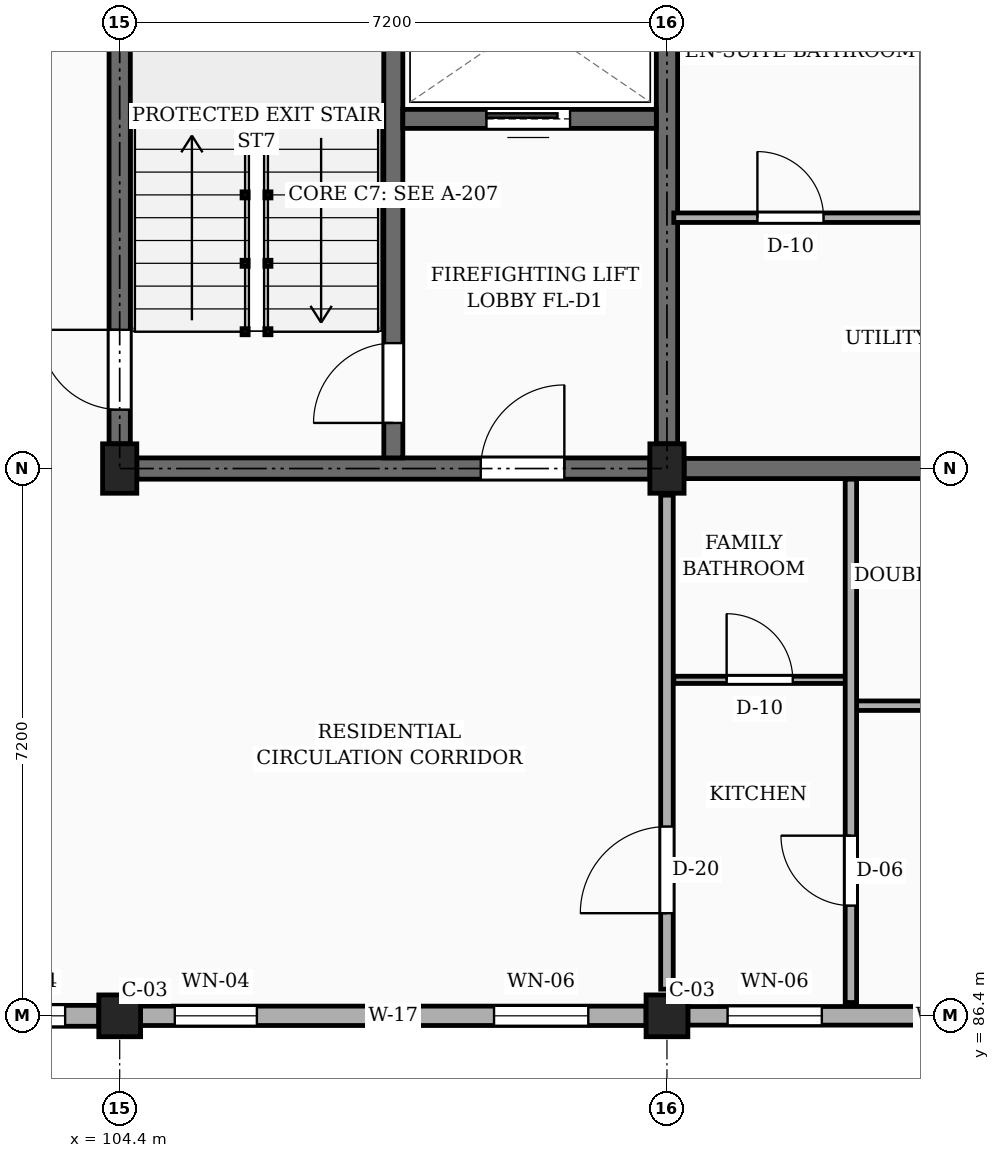
"""IFC4 building model, lengths in metres.
Left out: names, types, materials, properties, quantities, classifications, styles, units other than length and angle.
Written with IfcOpenShell. Run it as: python <this file> out.ifc"""

import sys

from ifc_helpers import new_model, si_unit, direction, frame, frame_2d, origin, origin_2d, place, context, subcontext, project, spatial, rectangle, extrude, element, fill, save


model = new_model("IFC4")
c1 = context("Model", 3, precision=1e-05, world=origin(), true_north=direction((0.0, 1.0)))
c2 = subcontext(c1, "Body", "Model", "MODEL_VIEW")
j1 = project(units=[si_unit("LENGTHUNIT", "METRE"), si_unit("PLANEANGLEUNIT", "RADIAN")], contexts=[c1])
p1 = place(None, origin())
s1 = spatial("IfcSite", under=j1, at=p1, CompositionType="ELEMENT")
p2 = place(p1, origin())
s2 = spatial("IfcBuilding", under=s1, at=p2, CompositionType="ELEMENT")
p3 = place(p2, frame((0.0, 0.0, 10.8)))
s3 = spatial("IfcBuildingStorey", under=s2, at=p3, CompositionType="ELEMENT", Elevation=10.8)
p4 = place(p3, frame((104.4, 86.4, 0.0), z_axis=(0.0, 0.0, 1.0), x_axis=(1.0, 0.0, 0.0)))
e1 = element("IfcColumn", 1, at=p4, inside=s3, PredefinedType="COLUMN", context=c2, shape_type="SweptSolid", body=[
    extrude(rectangle(XDim=0.55, YDim=0.55, at=origin_2d()), origin(), (0.0, 0.0, 1.0), 3.15),
])
p5 = place(p3, frame((104.4, 93.6, 0.0), z_axis=(0.0, 0.0, 1.0), x_axis=(1.0, 0.0, 0.0)))
e2 = element("IfcColumn", 2, at=p5, inside=s3, PredefinedType="COLUMN", context=c2, shape_type="SweptSolid", body=[
    extrude(rectangle(XDim=0.45, YDim=0.65, at=origin_2d()), origin(), (0.0, 0.0, 1.0), 3.15),
])
p6 = place(p3, frame((111.6, 86.4, 0.0), z_axis=(0.0, 0.0, 1.0), x_axis=(1.0, 0.0, 0.0)))
e3 = element("IfcColumn", 3, at=p6, inside=s3, PredefinedType="COLUMN", context=c2, shape_type="SweptSolid", body=[
    extrude(rectangle(XDim=0.55, YDim=0.55, at=origin_2d()), origin(), (0.0, 0.0, 1.0), 3.15),
])
p7 = place(p3, frame((111.6, 93.6, 0.0), z_axis=(0.0, 0.0, 1.0), x_axis=(1.0, 0.0, 0.0)))
e4 = element("IfcColumn", 4, at=p7, inside=s3, PredefinedType="COLUMN", context=c2, shape_type="SweptSolid", body=[
    extrude(rectangle(XDim=0.45, YDim=0.65, at=origin_2d()), origin(), (0.0, 0.0, 1.0), 3.15),
])
p8 = place(p3, frame((111.825, 93.6, 0.0), z_axis=(0.0, 0.0, 1.0), x_axis=(1.0, 0.0, 0.0)))
e5 = element("IfcWall", 5, at=p8, inside=s3, PredefinedType="SOLIDWALL", context=c2, shape_type="SweptSolid", body=[
    extrude(rectangle(XDim=6.7, YDim=0.265, at=frame_2d((3.35, 0.0))), origin(), (0.0, 0.0, 1.0), 2.19),
])
p9 = place(p8, frame((4.35, 0.0, 0.0)))
e6 = element("IfcOpeningElement", 6, at=p9, cuts=e5, PredefinedType="OPENING", context=c2, shape_type="SweptSolid", body=[
    extrude(rectangle(XDim=0.98, YDim=2.12, at=frame_2d((0.49, 1.06))), frame((0.0, 0.143, 0.0), z_axis=(0.0, -1.0, 0.0), x_axis=(1.0, 0.0, 0.0)), (0.0, 0.0, 1.0), 0.285),
])
p10 = place(p3, frame((97.475, 86.4, 0.0), z_axis=(0.0, 0.0, 1.0), x_axis=(1.0, 0.0, 0.0)))
e7 = element("IfcWall", 7, at=p10, inside=s3, PredefinedType="SOLIDWALL", context=c2, shape_type="SweptSolid", body=[
    extrude(rectangle(XDim=6.65, YDim=0.275, at=frame_2d((3.325, 0.0))), origin(), (0.0, 0.0, 1.0), 2.46),
])
p11 = place(p10, frame((2.665, 0.0, 0.78)))
e8 = element("IfcOpeningElement", 8, at=p11, cuts=e7, PredefinedType="OPENING", context=c2, shape_type="SweptSolid", body=[
    extrude(rectangle(XDim=0.92, YDim=1.15, at=frame_2d((0.46, 0.575))), frame((0.0, 0.147, 0.0), z_axis=(0.0, -1.0, 0.0), x_axis=(1.0, 0.0, 0.0)), (0.0, 0.0, 1.0), 0.295),
])
p12 = place(p10, frame((5.127, 0.0, 0.78)))
e9 = element("IfcOpeningElement", 9, at=p12, cuts=e7, PredefinedType="OPENING", context=c2, shape_type="SweptSolid", body=[
    extrude(rectangle(XDim=1.08, YDim=1.15, at=frame_2d((0.54, 0.575))), frame((0.0, 0.147, 0.0), z_axis=(0.0, -1.0, 0.0), x_axis=(1.0, 0.0, 0.0)), (0.0, 0.0, 1.0), 0.295),
])
p13 = place(p3, frame((104.675, 86.4, 0.0), z_axis=(0.0, 0.0, 1.0), x_axis=(1.0, 0.0, 0.0)))
e10 = element("IfcWall", 10, at=p13, inside=s3, PredefinedType="SOLIDWALL", context=c2, shape_type="SweptSolid", body=[
    extrude(rectangle(XDim=6.65, YDim=0.255, at=frame_2d((3.325, 0.0))), origin(), (0.0, 0.0, 1.0), 2.46),
])
p14 = place(p13, frame((0.45, 0.0, 0.78)))
e11 = element("IfcOpeningElement", 11, at=p14, cuts=e10, PredefinedType="OPENING", context=c2, shape_type="SweptSolid", body=[
    extrude(rectangle(XDim=1.08, YDim=1.15, at=frame_2d((0.54, 0.575))), frame((0.0, 0.137, 0.0), z_axis=(0.0, -1.0, 0.0), x_axis=(1.0, 0.0, 0.0)), (0.0, 0.0, 1.0), 0.275),
])
p15 = place(p13, frame((4.65, 0.0, 0.78)))
e12 = element("IfcOpeningElement", 12, at=p15, cuts=e10, PredefinedType="OPENING", context=c2, shape_type="SweptSolid", body=[
    extrude(rectangle(XDim=1.24, YDim=1.15, at=frame_2d((0.62, 0.575))), frame((0.0, 0.137, 0.0), z_axis=(0.0, -1.0, 0.0), x_axis=(1.0, 0.0, 0.0)), (0.0, 0.0, 1.0), 0.275),
])
p16 = place(p3, frame((111.875, 86.4, 0.0), z_axis=(0.0, 0.0, 1.0), x_axis=(1.0, 0.0, 0.0)))
e13 = element("IfcWall", 13, at=p16, inside=s3, PredefinedType="SOLIDWALL", context=c2, shape_type="SweptSolid", body=[
    extrude(rectangle(XDim=6.65, YDim=0.245, at=frame_2d((3.325, 0.0))), origin(), (0.0, 0.0, 1.0), 2.46),
])
p17 = place(p16, frame((0.522, 0.0, 0.78)))
e14 = element("IfcOpeningElement", 14, at=p17, cuts=e13, PredefinedType="OPENING", context=c2, shape_type="SweptSolid", body=[
    extrude(rectangle(XDim=1.24, YDim=1.15, at=frame_2d((0.62, 0.575))), frame((0.0, 0.133, 0.0), z_axis=(0.0, -1.0, 0.0), x_axis=(1.0, 0.0, 0.0)), (0.0, 0.0, 1.0), 0.265),
])
p18 = place(p16, frame((3.627, 0.0, 0.78)))
e15 = element("IfcOpeningElement", 15, at=p18, cuts=e13, PredefinedType="OPENING", context=c2, shape_type="SweptSolid", body=[
    extrude(rectangle(XDim=1.4, YDim=1.15, at=frame_2d((0.7, 0.575))), frame((0.0, 0.133, 0.0), z_axis=(0.0, -1.0, 0.0), x_axis=(1.0, 0.0, 0.0)), (0.0, 0.0, 1.0), 0.265),
])
p19 = place(p3, frame((104.4, 93.925, 0.0), z_axis=(0.0, 0.0, 1.0), x_axis=(0.0, 1.0, 0.0)))
e16 = element("IfcWall", 16, at=p19, inside=s3, PredefinedType="SHEAR", context=c2, shape_type="SweptSolid", body=[
    extrude(rectangle(XDim=6.55, YDim=0.28, at=frame_2d((3.275, 0.0))), origin(), (0.0, 0.0, 1.0), 2.89),
])
p20 = place(p19, frame((0.45, 0.0, 0.0)))
e17 = element("IfcOpeningElement", 17, at=p20, cuts=e16, PredefinedType="OPENING", context=c2, shape_type="SweptSolid", body=[
    extrude(rectangle(XDim=1.05, YDim=2.15, at=frame_2d((0.525, 1.075))), frame((0.0, 0.15, 0.0), z_axis=(0.0, -1.0, 0.0), x_axis=(1.0, 0.0, 0.0)), (0.0, 0.0, 1.0), 0.3),
])
p21 = place(p3, frame((111.6, 93.925, 0.0), z_axis=(0.0, 0.0, 1.0), x_axis=(0.0, 1.0, 0.0)))
e18 = element("IfcWall", 18, at=p21, inside=s3, PredefinedType="SHEAR", context=c2, shape_type="SweptSolid", body=[
    extrude(rectangle(XDim=6.55, YDim=0.28, at=frame_2d((3.275, 0.0))), origin(), (0.0, 0.0, 1.0), 2.89),
])
p22 = place(p3, frame((104.625, 93.6, 0.0), z_axis=(0.0, 0.0, 1.0), x_axis=(1.0, 0.0, 0.0)))
e19 = element("IfcWall", 19, at=p22, inside=s3, PredefinedType="SHEAR", context=c2, shape_type="SweptSolid", body=[
    extrude(rectangle(XDim=6.75, YDim=0.28, at=frame_2d((3.375, 0.0))), origin(), (0.0, 0.0, 1.0), 2.89),
])
p23 = place(p22, frame((4.525, 0.0, 0.0)))
e20 = element("IfcOpeningElement", 20, at=p23, cuts=e19, PredefinedType="OPENING", context=c2, shape_type="SweptSolid", body=[
    extrude(rectangle(XDim=1.1, YDim=2.15, at=frame_2d((0.55, 1.075))), frame((0.0, 0.15, 0.0), z_axis=(0.0, -1.0, 0.0), x_axis=(1.0, 0.0, 0.0)), (0.0, 0.0, 1.0), 0.3),
])
p24 = place(p3, frame((108.0, 93.74, 0.0), z_axis=(0.0, 0.0, 1.0), x_axis=(0.0, 1.0, 0.0)))
e21 = element("IfcWall", 21, at=p24, inside=s3, PredefinedType="SHEAR", context=c2, shape_type="SweptSolid", body=[
    extrude(rectangle(XDim=6.92, YDim=0.25, at=frame_2d((3.46, 0.0))), origin(), (0.0, 0.0, 1.0), 2.89),
])
p25 = place(p24, frame((0.46, 0.0, 0.0)))
e22 = element("IfcOpeningElement", 22, at=p25, cuts=e21, PredefinedType="OPENING", context=c2, shape_type="SweptSolid", body=[
    extrude(rectangle(XDim=1.05, YDim=2.15, at=frame_2d((0.525, 1.075))), frame((0.0, 0.135, 0.0), z_axis=(0.0, -1.0, 0.0), x_axis=(1.0, 0.0, 0.0)), (0.0, 0.0, 1.0), 0.27),
])
p26 = place(p3, frame((108.125, 98.2, 0.0), z_axis=(0.0, 0.0, 1.0), x_axis=(1.0, 0.0, 0.0)))
e23 = element("IfcWall", 23, at=p26, inside=s3, PredefinedType="SHEAR", context=c2, shape_type="SweptSolid", body=[
    extrude(rectangle(XDim=3.335, YDim=0.25, at=frame_2d((1.667, 0.0))), origin(), (0.0, 0.0, 1.0), 2.89),
])
p27 = place(p26, frame((1.1, 0.0, 0.0)))
e24 = element("IfcOpeningElement", 24, at=p27, cuts=e23, PredefinedType="OPENING", context=c2, shape_type="SweptSolid", body=[
    extrude(rectangle(XDim=1.1, YDim=2.2, at=frame_2d((0.55, 1.1))), frame((0.0, 0.135, 0.0), z_axis=(0.0, -1.0, 0.0), x_axis=(1.0, 0.0, 0.0)), (0.0, 0.0, 1.0), 0.27),
])
p28 = place(p3, frame((111.6, 86.75, 0.0), z_axis=(0.0, 0.0, 1.0), x_axis=(0.0, 1.0, 0.0)))
e25 = element("IfcWall", 25, at=p28, inside=s3, PredefinedType="PARTITIONING", context=c2, shape_type="SweptSolid", body=[
    extrude(rectangle(XDim=6.5, YDim=0.165, at=frame_2d((3.25, 0.0))), origin(), (0.0, 0.0, 1.0), 2.24),
])
p29 = place(p28, frame((1.0, 0.0, 0.0)))
e26 = element("IfcOpeningElement", 26, at=p29, cuts=e25, PredefinedType="OPENING", context=c2, shape_type="SweptSolid", body=[
    extrude(rectangle(XDim=1.14, YDim=2.18, at=frame_2d((0.57, 1.09))), frame((0.0, 0.093, 0.0), z_axis=(0.0, -1.0, 0.0), x_axis=(1.0, 0.0, 0.0)), (0.0, 0.0, 1.0), 0.185),
])
p30 = place(p3, frame((114.09, 90.48, 0.0), z_axis=(0.0, 0.0, 1.0), x_axis=(1.0, 0.0, 0.0)))
e27 = element("IfcWall", 27, at=p30, inside=s3, PredefinedType="PARTITIONING", context=c2, shape_type="SweptSolid", body=[
    extrude(rectangle(XDim=4.535, YDim=0.125, at=frame_2d((2.268, 0.0))), origin(), (0.0, 0.0, 1.0), 2.325),
])
p31 = place(p30, frame((1.827, 0.0, 0.0)))
e28 = element("IfcOpeningElement", 28, at=p31, cuts=e27, PredefinedType="OPENING", context=c2, shape_type="SweptSolid", body=[
    extrude(rectangle(XDim=0.88, YDim=2.08, at=frame_2d((0.44, 1.04))), frame((0.0, 0.073, 0.0), z_axis=(0.0, -1.0, 0.0), x_axis=(1.0, 0.0, 0.0)), (0.0, 0.0, 1.0), 0.145),
])
p32 = place(p3, frame((111.69, 90.82, 0.0), z_axis=(0.0, 0.0, 1.0), x_axis=(1.0, 0.0, 0.0)))
e29 = element("IfcWall", 29, at=p32, inside=s3, PredefinedType="PARTITIONING", context=c2, shape_type="SweptSolid", body=[
    extrude(rectangle(XDim=2.26, YDim=0.095, at=frame_2d((1.13, 0.0))), origin(), (0.0, 0.0, 1.0), 2.325),
])
p33 = place(p32, frame((0.695, 0.0, 0.0)))
e30 = element("IfcOpeningElement", 30, at=p33, cuts=e29, PredefinedType="OPENING", context=c2, shape_type="SweptSolid", body=[
    extrude(rectangle(XDim=0.87, YDim=2.05, at=frame_2d((0.435, 1.025))), frame((0.0, 0.058, 0.0), z_axis=(0.0, -1.0, 0.0), x_axis=(1.0, 0.0, 0.0)), (0.0, 0.0, 1.0), 0.115),
])
p34 = place(p3, frame((114.02, 86.575, 0.0), z_axis=(0.0, 0.0, 1.0), x_axis=(0.0, 1.0, 0.0)))
e31 = element("IfcWall", 31, at=p34, inside=s3, PredefinedType="PARTITIONING", context=c2, shape_type="SweptSolid", body=[
    extrude(rectangle(XDim=6.885, YDim=0.15, at=frame_2d((3.442, 0.0))), origin(), (0.0, 0.0, 1.0), 2.325),
])
p35 = place(p34, frame((1.275, 0.0, 0.0)))
e32 = element("IfcOpeningElement", 32, at=p35, cuts=e31, PredefinedType="OPENING", context=c2, shape_type="SweptSolid", body=[
    extrude(rectangle(XDim=0.92, YDim=2.1, at=frame_2d((0.46, 1.05))), frame((0.0, 0.085, 0.0), z_axis=(0.0, -1.0, 0.0), x_axis=(1.0, 0.0, 0.0)), (0.0, 0.0, 1.0), 0.17),
])
p36 = place(p3, frame((111.69, 96.9, 0.0), z_axis=(0.0, 0.0, 1.0), x_axis=(1.0, 0.0, 0.0)))
e33 = element("IfcWall", 33, at=p36, inside=s3, PredefinedType="PARTITIONING", context=c2, shape_type="SweptSolid", body=[
    extrude(rectangle(XDim=6.935, YDim=0.125, at=frame_2d((3.468, 0.0))), origin(), (0.0, 0.0, 1.0), 2.325),
])
p37 = place(p36, frame((1.1, 0.0, 0.0)))
e34 = element("IfcOpeningElement", 34, at=p37, cuts=e33, PredefinedType="OPENING", context=c2, shape_type="SweptSolid", body=[
    extrude(rectangle(XDim=0.87, YDim=2.05, at=frame_2d((0.435, 1.025))), frame((0.0, 0.073, 0.0), z_axis=(0.0, -1.0, 0.0), x_axis=(1.0, 0.0, 0.0)), (0.0, 0.0, 1.0), 0.145),
])
p38 = place(p36, frame((4.5, 0.0, 0.0)))
e35 = element("IfcOpeningElement", 35, at=p38, cuts=e33, PredefinedType="OPENING", context=c2, shape_type="SweptSolid", body=[
    extrude(rectangle(XDim=0.88, YDim=2.08, at=frame_2d((0.44, 1.04))), frame((0.0, 0.073, 0.0), z_axis=(0.0, -1.0, 0.0), x_axis=(1.0, 0.0, 0.0)), (0.0, 0.0, 1.0), 0.145),
])
p39 = place(p12, origin())
e36 = element("IfcWindow", 36, at=p39, inside=s3, PartitioningType="SINGLE_PANEL", PredefinedType="WINDOW", context=c2, shape_type="SweptSolid", body=[
    extrude(rectangle(XDim=1.08, YDim=1.15, at=frame_2d((0.54, 0.575))), frame((0.0, 0.03, 0.0), z_axis=(0.0, -1.0, 0.0), x_axis=(1.0, 0.0, 0.0)), (0.0, 0.0, 1.0), 0.06),
])
fill(e9, e36)
p40 = place(p14, origin())
e37 = element("IfcWindow", 37, at=p40, inside=s3, PartitioningType="SINGLE_PANEL", PredefinedType="WINDOW", context=c2, shape_type="SweptSolid", body=[
    extrude(rectangle(XDim=1.08, YDim=1.15, at=frame_2d((0.54, 0.575))), frame((0.0, 0.03, 0.0), z_axis=(0.0, -1.0, 0.0), x_axis=(1.0, 0.0, 0.0)), (0.0, 0.0, 1.0), 0.06),
])
fill(e11, e37)
p41 = place(p15, origin())
e38 = element("IfcWindow", 38, at=p41, inside=s3, PartitioningType="SINGLE_PANEL", PredefinedType="WINDOW", context=c2, shape_type="SweptSolid", body=[
    extrude(rectangle(XDim=1.24, YDim=1.15, at=frame_2d((0.62, 0.575))), frame((0.0, 0.03, 0.0), z_axis=(0.0, -1.0, 0.0), x_axis=(1.0, 0.0, 0.0)), (0.0, 0.0, 1.0), 0.06),
])
fill(e12, e38)
p42 = place(p17, origin())
e39 = element("IfcWindow", 39, at=p42, inside=s3, PartitioningType="SINGLE_PANEL", PredefinedType="WINDOW", context=c2, shape_type="SweptSolid", body=[
    extrude(rectangle(XDim=1.24, YDim=1.15, at=frame_2d((0.62, 0.575))), frame((0.0, 0.03, 0.0), z_axis=(0.0, -1.0, 0.0), x_axis=(1.0, 0.0, 0.0)), (0.0, 0.0, 1.0), 0.06),
])
fill(e14, e39)
p43 = place(p20, origin())
e40 = element("IfcDoor", 40, at=p43, inside=s3, OperationType="SINGLE_SWING_RIGHT", PredefinedType="DOOR", context=c2, shape_type="SweptSolid", body=[
    extrude(rectangle(XDim=1.05, YDim=2.15, at=frame_2d((0.525, 1.075))), frame((0.0, 0.025, 0.0), z_axis=(0.0, -1.0, 0.0), x_axis=(1.0, 0.0, 0.0)), (0.0, 0.0, 1.0), 0.05),
])
fill(e17, e40)
p44 = place(p23, frame((1.1, 0.0, 0.0), z_axis=(0.0, 0.0, 1.0), x_axis=(-1.0, 0.0, 0.0)))
e41 = element("IfcDoor", 41, at=p44, inside=s3, OperationType="SINGLE_SWING_RIGHT", PredefinedType="DOOR", context=c2, shape_type="SweptSolid", body=[
    extrude(rectangle(XDim=1.1, YDim=2.15, at=frame_2d((0.55, 1.075))), frame((0.0, 0.025, 0.0), z_axis=(0.0, -1.0, 0.0), x_axis=(1.0, 0.0, 0.0)), (0.0, 0.0, 1.0), 0.05),
])
fill(e20, e41)
p45 = place(p25, origin())
e42 = element("IfcDoor", 42, at=p45, inside=s3, OperationType="SINGLE_SWING_LEFT", PredefinedType="DOOR", context=c2, shape_type="SweptSolid", body=[
    extrude(rectangle(XDim=1.05, YDim=2.15, at=frame_2d((0.525, 1.075))), frame((0.0, 0.025, 0.0), z_axis=(0.0, -1.0, 0.0), x_axis=(1.0, 0.0, 0.0)), (0.0, 0.0, 1.0), 0.05),
])
fill(e22, e42)
p46 = place(p27, origin())
e43 = element("IfcDoor", 43, at=p46, inside=s3, OperationType="SLIDING_TO_LEFT", PredefinedType="DOOR", context=c2, shape_type="SweptSolid", body=[
    extrude(rectangle(XDim=1.1, YDim=2.2, at=frame_2d((0.55, 1.1))), frame((0.0, 0.025, 0.0), z_axis=(0.0, -1.0, 0.0), x_axis=(1.0, 0.0, 0.0)), (0.0, 0.0, 1.0), 0.05),
])
fill(e24, e43)
p47 = place(p29, origin())
e44 = element("IfcDoor", 44, at=p47, inside=s3, OperationType="SINGLE_SWING_LEFT", PredefinedType="DOOR", context=c2, shape_type="SweptSolid", body=[
    extrude(rectangle(XDim=1.14, YDim=2.18, at=frame_2d((0.57, 1.09))), frame((0.0, 0.025, 0.0), z_axis=(0.0, -1.0, 0.0), x_axis=(1.0, 0.0, 0.0)), (0.0, 0.0, 1.0), 0.05),
])
fill(e26, e44)
p48 = place(p33, origin())
e45 = element("IfcDoor", 45, at=p48, inside=s3, OperationType="SINGLE_SWING_LEFT", PredefinedType="DOOR", context=c2, shape_type="SweptSolid", body=[
    extrude(rectangle(XDim=0.87, YDim=2.05, at=frame_2d((0.435, 1.025))), frame((0.0, 0.025, 0.0), z_axis=(0.0, -1.0, 0.0), x_axis=(1.0, 0.0, 0.0)), (0.0, 0.0, 1.0), 0.05),
])
fill(e30, e45)
p49 = place(p35, origin())
e46 = element("IfcDoor", 46, at=p49, inside=s3, OperationType="SINGLE_SWING_RIGHT", PredefinedType="DOOR", context=c2, shape_type="SweptSolid", body=[
    extrude(rectangle(XDim=0.92, YDim=2.1, at=frame_2d((0.46, 1.05))), frame((0.0, 0.025, 0.0), z_axis=(0.0, -1.0, 0.0), x_axis=(1.0, 0.0, 0.0)), (0.0, 0.0, 1.0), 0.05),
])
fill(e32, e46)
p50 = place(p37, origin())
e47 = element("IfcDoor", 47, at=p50, inside=s3, OperationType="SINGLE_SWING_LEFT", PredefinedType="DOOR", context=c2, shape_type="SweptSolid", body=[
    extrude(rectangle(XDim=0.87, YDim=2.05, at=frame_2d((0.435, 1.025))), frame((0.0, 0.025, 0.0), z_axis=(0.0, -1.0, 0.0), x_axis=(1.0, 0.0, 0.0)), (0.0, 0.0, 1.0), 0.05),
])
fill(e34, e47)
save(model, sys.argv[1])
